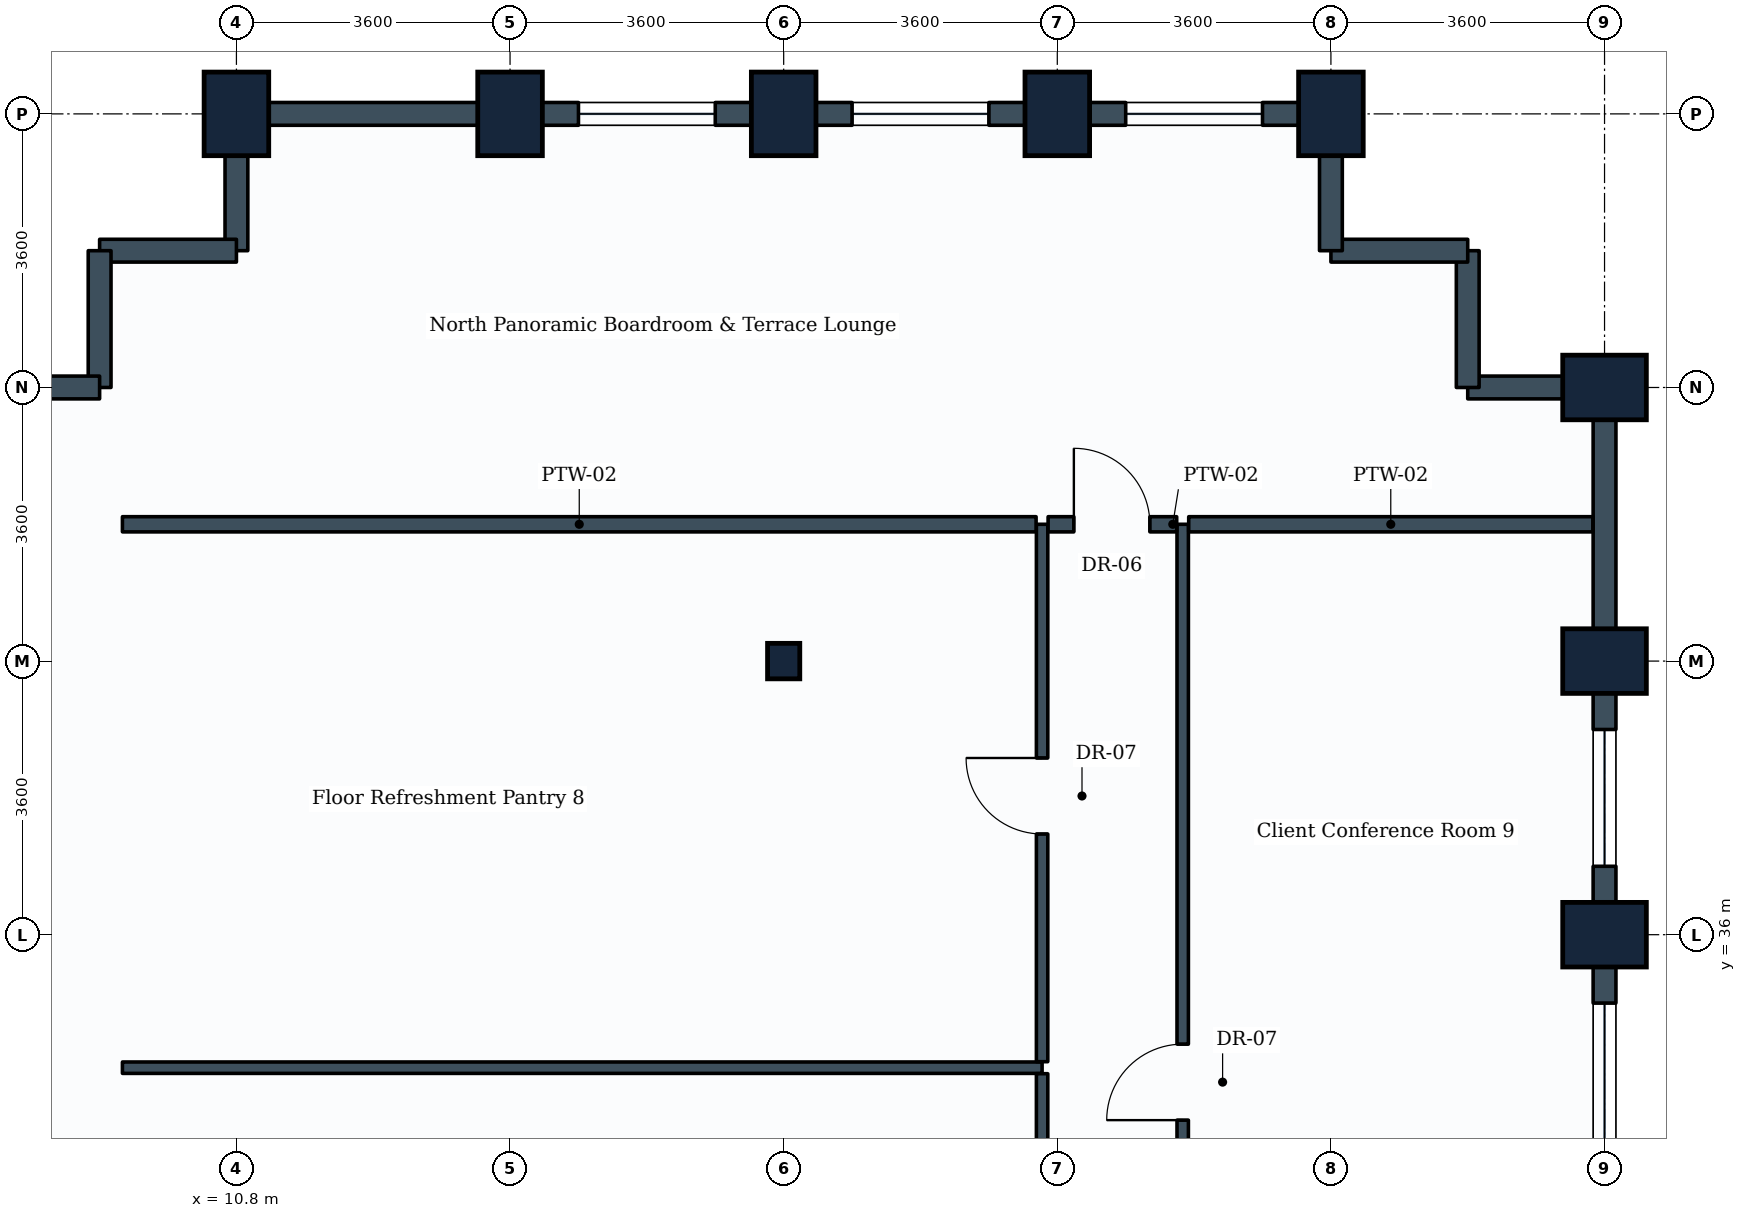
"""IFC4 building model, lengths in metres.
Left out: names, types, materials, properties, quantities, classifications, styles, units other than length and angle.
Written with IfcOpenShell. Run it as: python <this file> out.ifc"""

import sys

from ifc_helpers import new_model, si_unit, direction, frame, frame_2d, origin, origin_2d, place, context, subcontext, project, spatial, rectangle, i_section, extrude, element, fill, save


model = new_model("IFC4")
c1 = context("Model", 3, precision=1e-05, world=origin(), true_north=direction((0.0, 1.0)))
c2 = subcontext(c1, "Body", "Model", "MODEL_VIEW")
j1 = project(units=[si_unit("LENGTHUNIT", "METRE"), si_unit("PLANEANGLEUNIT", "RADIAN")], contexts=[c1])
p1 = place(None, origin())
s1 = spatial("IfcSite", under=j1, at=p1, CompositionType="ELEMENT")
p2 = place(p1, origin())
s2 = spatial("IfcBuilding", under=s1, at=p2, CompositionType="ELEMENT")
p3 = place(p2, frame((0.0, 0.0, 87.9)))
s3 = spatial("IfcBuildingStorey", under=s2, at=p3, CompositionType="ELEMENT", Elevation=87.9)
for number, where, z_axis, x_axis in (
    (1, (10.8, 46.8, 0.0), (0.0, 0.0, 1.0), (1.0, 0.0, 0.0)),
    (2, (14.4, 46.8, 0.0), (0.0, 0.0, 1.0), (1.0, 0.0, 0.0)),
):
    element("IfcColumn", number, at=place(p3, frame(where, z_axis=z_axis, x_axis=x_axis)), inside=s3, PredefinedType="COLUMN", context=c2, shape_type="SweptSolid", body=[
        extrude(rectangle(XDim=0.85, YDim=1.1, at=origin_2d()), origin(), (0.0, 0.0, 1.0), 3.9),
    ])
p4 = place(p3, frame((18.0, 39.6, 0.0), z_axis=(0.0, 0.0, 1.0), x_axis=(1.0, 0.0, 0.0)))
e3 = element("IfcColumn", 3, at=p4, inside=s3, PredefinedType="COLUMN", context=c2, shape_type="SweptSolid", body=[
    extrude(i_section(OverallWidth=0.424, OverallDepth=0.467, WebThickness=0.033, FlangeThickness=0.053, FilletRadius=0.015, at=origin_2d()), origin(), (0.0, 0.0, 1.0), 3.9),
])
for number, where, z_axis, x_axis in (
    (4, (18.0, 46.8, 0.0), (0.0, 0.0, 1.0), (1.0, 0.0, 0.0)),
    (5, (21.6, 46.8, 0.0), (0.0, 0.0, 1.0), (1.0, 0.0, 0.0)),
    (6, (25.2, 46.8, 0.0), (0.0, 0.0, 1.0), (1.0, 0.0, 0.0)),
    (7, (28.8, 36.0, 0.0), (0.0, 0.0, 1.0), (0.0, 1.0, 0.0)),
    (8, (28.8, 39.6, 0.0), (0.0, 0.0, 1.0), (0.0, 1.0, 0.0)),
    (9, (28.8, 43.2, 0.0), (0.0, 0.0, 1.0), (0.0, 1.0, 0.0)),
):
    element("IfcColumn", number, at=place(p3, frame(where, z_axis=z_axis, x_axis=x_axis)), inside=s3, PredefinedType="COLUMN", context=c2, shape_type="SweptSolid", body=[
        extrude(rectangle(XDim=0.85, YDim=1.1, at=origin_2d()), origin(), (0.0, 0.0, 1.0), 3.9),
    ])
p5 = place(p3, frame((28.8, 36.0, 0.0), z_axis=(0.0, 0.0, 1.0), x_axis=(0.0, -1.0, 0.0)))
e10 = element("IfcWall", 10, at=p5, inside=s3, PredefinedType="STANDARD", context=c2, shape_type="SweptSolid", body=[
    extrude(rectangle(XDim=3.6, YDim=0.3, at=frame_2d((1.8, 0.0))), origin(), (0.0, 0.0, 1.0), 2.93),
])
p6 = place(p5, frame((0.9, 0.0, 0.85)))
e11 = element("IfcOpeningElement", 11, at=p6, cuts=e10, PredefinedType="OPENING", context=c2, shape_type="SweptSolid", body=[
    extrude(rectangle(XDim=1.8, YDim=1.35, at=frame_2d((0.9, 0.675))), frame((0.0, 0.16, 0.0), z_axis=(0.0, -1.0, 0.0), x_axis=(1.0, 0.0, 0.0)), (0.0, 0.0, 1.0), 0.32),
])
p7 = place(p3, frame((28.8, 39.6, 0.0), z_axis=(0.0, 0.0, 1.0), x_axis=(0.0, -1.0, 0.0)))
e12 = element("IfcWall", 12, at=p7, inside=s3, PredefinedType="STANDARD", context=c2, shape_type="SweptSolid", body=[
    extrude(rectangle(XDim=3.6, YDim=0.3, at=frame_2d((1.8, 0.0))), origin(), (0.0, 0.0, 1.0), 2.93),
])
p8 = place(p7, frame((0.9, 0.0, 0.85)))
e13 = element("IfcOpeningElement", 13, at=p8, cuts=e12, PredefinedType="OPENING", context=c2, shape_type="SweptSolid", body=[
    extrude(rectangle(XDim=1.8, YDim=1.35, at=frame_2d((0.9, 0.675))), frame((0.0, 0.16, 0.0), z_axis=(0.0, -1.0, 0.0), x_axis=(1.0, 0.0, 0.0)), (0.0, 0.0, 1.0), 0.32),
])
p9 = place(p3, frame((28.8, 43.2, 0.0), z_axis=(0.0, 0.0, 1.0), x_axis=(0.0, -1.0, 0.0)))
e14 = element("IfcWall", 14, at=p9, inside=s3, PredefinedType="STANDARD", context=c2, shape_type="SweptSolid", body=[
    extrude(rectangle(XDim=3.6, YDim=0.3, at=frame_2d((1.8, 0.0))), origin(), (0.0, 0.0, 1.0), 2.93),
])
p10 = place(p3, frame((27.0, 43.2, 0.0), z_axis=(0.0, 0.0, 1.0), x_axis=(1.0, 0.0, 0.0)))
e15 = element("IfcWall", 15, at=p10, inside=s3, PredefinedType="STANDARD", context=c2, shape_type="SweptSolid", body=[
    extrude(rectangle(XDim=1.8, YDim=0.3, at=frame_2d((0.9, 0.0))), origin(), (0.0, 0.0, 1.0), 2.93),
])
for number, where, z_axis, x_axis in (
    (16, (27.0, 43.2, 0.0), (0.0, 0.0, 1.0), (0.0, 1.0, 0.0)),
    (17, (25.2, 45.0, 0.0), (0.0, 0.0, 1.0), (1.0, 0.0, 0.0)),
):
    element("IfcWall", number, at=place(p3, frame(where, z_axis=z_axis, x_axis=x_axis)), inside=s3, PredefinedType="STANDARD", context=c2, shape_type="SweptSolid", body=[
        extrude(rectangle(XDim=1.8, YDim=0.3, at=frame_2d((0.9, 0.0))), origin(), (0.0, 0.0, 1.0), 3.635),
    ])
p11 = place(p3, frame((25.2, 45.0, 0.0), z_axis=(0.0, 0.0, 1.0), x_axis=(0.0, 1.0, 0.0)))
e18 = element("IfcWall", 18, at=p11, inside=s3, PredefinedType="STANDARD", context=c2, shape_type="SweptSolid", body=[
    extrude(rectangle(XDim=1.8, YDim=0.3, at=frame_2d((0.9, 0.0))), origin(), (0.0, 0.0, 1.0), 2.93),
])
p12 = place(p3, frame((21.6, 46.8, 0.0), z_axis=(0.0, 0.0, 1.0), x_axis=(1.0, 0.0, 0.0)))
e19 = element("IfcWall", 19, at=p12, inside=s3, PredefinedType="STANDARD", context=c2, shape_type="SweptSolid", body=[
    extrude(rectangle(XDim=3.6, YDim=0.3, at=frame_2d((1.8, 0.0))), origin(), (0.0, 0.0, 1.0), 2.93),
])
p13 = place(p12, frame((0.9, 0.0, 0.85)))
e20 = element("IfcOpeningElement", 20, at=p13, cuts=e19, PredefinedType="OPENING", context=c2, shape_type="SweptSolid", body=[
    extrude(rectangle(XDim=1.8, YDim=1.35, at=frame_2d((0.9, 0.675))), frame((0.0, 0.16, 0.0), z_axis=(0.0, -1.0, 0.0), x_axis=(1.0, 0.0, 0.0)), (0.0, 0.0, 1.0), 0.32),
])
p14 = place(p3, frame((18.0, 46.8, 0.0), z_axis=(0.0, 0.0, 1.0), x_axis=(1.0, 0.0, 0.0)))
e21 = element("IfcWall", 21, at=p14, inside=s3, PredefinedType="STANDARD", context=c2, shape_type="SweptSolid", body=[
    extrude(rectangle(XDim=3.6, YDim=0.3, at=frame_2d((1.8, 0.0))), origin(), (0.0, 0.0, 1.0), 2.93),
])
p15 = place(p14, frame((0.9, 0.0, 0.85)))
e22 = element("IfcOpeningElement", 22, at=p15, cuts=e21, PredefinedType="OPENING", context=c2, shape_type="SweptSolid", body=[
    extrude(rectangle(XDim=1.8, YDim=1.35, at=frame_2d((0.9, 0.675))), frame((0.0, 0.16, 0.0), z_axis=(0.0, -1.0, 0.0), x_axis=(1.0, 0.0, 0.0)), (0.0, 0.0, 1.0), 0.32),
])
p16 = place(p3, frame((14.4, 46.8, 0.0), z_axis=(0.0, 0.0, 1.0), x_axis=(1.0, 0.0, 0.0)))
e23 = element("IfcWall", 23, at=p16, inside=s3, PredefinedType="STANDARD", context=c2, shape_type="SweptSolid", body=[
    extrude(rectangle(XDim=3.6, YDim=0.3, at=frame_2d((1.8, 0.0))), origin(), (0.0, 0.0, 1.0), 2.93),
])
p17 = place(p16, frame((0.9, 0.0, 0.85)))
e24 = element("IfcOpeningElement", 24, at=p17, cuts=e23, PredefinedType="OPENING", context=c2, shape_type="SweptSolid", body=[
    extrude(rectangle(XDim=1.8, YDim=1.35, at=frame_2d((0.9, 0.675))), frame((0.0, 0.16, 0.0), z_axis=(0.0, -1.0, 0.0), x_axis=(1.0, 0.0, 0.0)), (0.0, 0.0, 1.0), 0.32),
])
p18 = place(p3, frame((10.8, 46.8, 0.0), z_axis=(0.0, 0.0, 1.0), x_axis=(1.0, 0.0, 0.0)))
e25 = element("IfcWall", 25, at=p18, inside=s3, PredefinedType="STANDARD", context=c2, shape_type="SweptSolid", body=[
    extrude(rectangle(XDim=3.6, YDim=0.3, at=frame_2d((1.8, 0.0))), origin(), (0.0, 0.0, 1.0), 2.93),
])
p19 = place(p3, frame((10.8, 45.0, 0.0), z_axis=(0.0, 0.0, 1.0), x_axis=(0.0, 1.0, 0.0)))
e26 = element("IfcWall", 26, at=p19, inside=s3, PredefinedType="STANDARD", context=c2, shape_type="SweptSolid", body=[
    extrude(rectangle(XDim=1.8, YDim=0.3, at=frame_2d((0.9, 0.0))), origin(), (0.0, 0.0, 1.0), 2.93),
])
for number, where, z_axis, x_axis in (
    (27, (9.0, 45.0, 0.0), (0.0, 0.0, 1.0), (1.0, 0.0, 0.0)),
    (28, (9.0, 43.2, 0.0), (0.0, 0.0, 1.0), (0.0, 1.0, 0.0)),
):
    element("IfcWall", number, at=place(p3, frame(where, z_axis=z_axis, x_axis=x_axis)), inside=s3, PredefinedType="STANDARD", context=c2, shape_type="SweptSolid", body=[
        extrude(rectangle(XDim=1.8, YDim=0.3, at=frame_2d((0.9, 0.0))), origin(), (0.0, 0.0, 1.0), 3.635),
    ])
p20 = place(p3, frame((7.2, 43.2, 0.0), z_axis=(0.0, 0.0, 1.0), x_axis=(1.0, 0.0, 0.0)))
e29 = element("IfcWall", 29, at=p20, inside=s3, PredefinedType="STANDARD", context=c2, shape_type="SweptSolid", body=[
    extrude(rectangle(XDim=1.8, YDim=0.3, at=frame_2d((0.9, 0.0))), origin(), (0.0, 0.0, 1.0), 2.93),
])
p21 = place(p3, frame((9.3, 34.25, 0.0), z_axis=(0.0, 0.0, 1.0), x_axis=(1.0, 0.0, 0.0)))
e30 = element("IfcWall", 30, at=p21, inside=s3, PredefinedType="PARTITIONING", context=c2, shape_type="SweptSolid", body=[
    extrude(rectangle(XDim=12.1, YDim=0.15, at=frame_2d((6.05, 0.0))), origin(), (0.0, 0.0, 1.0), 3.18),
])
p22 = place(p3, frame((21.4, 26.879, 0.0), z_axis=(0.0, 0.0, 1.0), x_axis=(0.0, 1.0, 0.0)))
e31 = element("IfcWall", 31, at=p22, inside=s3, PredefinedType="PARTITIONING", context=c2, shape_type="SweptSolid", body=[
    extrude(rectangle(XDim=7.292, YDim=0.15, at=frame_2d((3.646, 0.0))), origin(), (0.0, 0.0, 1.0), 3.19),
])
p23 = place(p22, frame((3.146, 0.0, 0.0)))
e32 = element("IfcOpeningElement", 32, at=p23, cuts=e31, PredefinedType="OPENING", context=c2, shape_type="SweptSolid", body=[
    extrude(rectangle(XDim=1.0, YDim=2.1, at=frame_2d((0.5, 1.05))), frame((0.0, 0.085, 0.0), z_axis=(0.0, -1.0, 0.0), x_axis=(1.0, 0.0, 0.0)), (0.0, 0.0, 1.0), 0.17),
])
p24 = place(p3, frame((21.4, 34.329, 0.0), z_axis=(0.0, 0.0, 1.0), x_axis=(0.0, 1.0, 0.0)))
e33 = element("IfcWall", 33, at=p24, inside=s3, PredefinedType="PARTITIONING", context=c2, shape_type="SweptSolid", body=[
    extrude(rectangle(XDim=7.071, YDim=0.15, at=frame_2d((3.535, 0.0))), origin(), (0.0, 0.0, 1.0), 3.18),
])
p25 = place(p24, frame((2.996, 0.0, 0.0)))
e34 = element("IfcOpeningElement", 34, at=p25, cuts=e33, PredefinedType="OPENING", context=c2, shape_type="SweptSolid", body=[
    extrude(rectangle(XDim=1.0, YDim=2.1, at=frame_2d((0.5, 1.05))), frame((0.0, 0.085, 0.0), z_axis=(0.0, -1.0, 0.0), x_axis=(1.0, 0.0, 0.0)), (0.0, 0.0, 1.0), 0.17),
])
p26 = place(p3, frame((23.25, 26.879, 0.0), z_axis=(0.0, 0.0, 1.0), x_axis=(0.0, 1.0, 0.0)))
e35 = element("IfcWall", 35, at=p26, inside=s3, PredefinedType="PARTITIONING", context=c2, shape_type="SweptSolid", body=[
    extrude(rectangle(XDim=14.521, YDim=0.15, at=frame_2d((7.26, 0.0))), origin(), (0.0, 0.0, 1.0), 3.19),
])
p27 = place(p26, frame((6.681, 0.0, 0.0)))
e36 = element("IfcOpeningElement", 36, at=p27, cuts=e35, PredefinedType="OPENING", context=c2, shape_type="SweptSolid", body=[
    extrude(rectangle(XDim=1.0, YDim=2.1, at=frame_2d((0.5, 1.05))), frame((0.0, 0.085, 0.0), z_axis=(0.0, -1.0, 0.0), x_axis=(1.0, 0.0, 0.0)), (0.0, 0.0, 1.0), 0.17),
])
p28 = place(p3, frame((9.3, 41.4, 0.0), z_axis=(0.0, 0.0, 1.0), x_axis=(1.0, 0.0, 0.0)))
e37 = element("IfcWall", 37, at=p28, inside=s3, PredefinedType="PARTITIONING", context=c2, shape_type="SweptSolid", body=[
    extrude(rectangle(XDim=12.021, YDim=0.2, at=frame_2d((6.01, 0.0))), origin(), (0.0, 0.0, 1.0), 3.18),
])
p29 = place(p3, frame((23.329, 41.4, 0.0), z_axis=(0.0, 0.0, 1.0), x_axis=(1.0, 0.0, 0.0)))
e38 = element("IfcWall", 38, at=p29, inside=s3, PredefinedType="PARTITIONING", context=c2, shape_type="SweptSolid", body=[
    extrude(rectangle(XDim=5.317, YDim=0.2, at=frame_2d((2.658, 0.0))), origin(), (0.0, 0.0, 1.0), 2.93),
])
p30 = place(p3, frame((21.479, 41.4, 0.0), z_axis=(0.0, 0.0, 1.0), x_axis=(1.0, 0.0, 0.0)))
e39 = element("IfcWall", 39, at=p30, inside=s3, PredefinedType="PARTITIONING", context=c2, shape_type="SweptSolid", body=[
    extrude(rectangle(XDim=1.692, YDim=0.2, at=frame_2d((0.846, 0.0))), origin(), (0.0, 0.0, 1.0), 3.635),
])
p31 = place(p30, frame((0.339, 0.0, 0.0)))
e40 = element("IfcOpeningElement", 40, at=p31, cuts=e39, PredefinedType="OPENING", context=c2, shape_type="SweptSolid", body=[
    extrude(rectangle(XDim=1.0, YDim=2.1, at=frame_2d((0.5, 1.05))), frame((0.0, 0.11, 0.0), z_axis=(0.0, -1.0, 0.0), x_axis=(1.0, 0.0, 0.0)), (0.0, 0.0, 1.0), 0.22),
])
p32 = place(p6, origin())
e41 = element("IfcWindow", 41, at=p32, inside=s3, PartitioningType="SINGLE_PANEL", PredefinedType="WINDOW", context=c2, shape_type="SweptSolid", body=[
    extrude(rectangle(XDim=1.8, YDim=1.35, at=frame_2d((0.9, 0.675))), frame((0.0, 0.03, 0.0), z_axis=(0.0, -1.0, 0.0), x_axis=(1.0, 0.0, 0.0)), (0.0, 0.0, 1.0), 0.06),
])
fill(e11, e41)
p33 = place(p8, origin())
e42 = element("IfcWindow", 42, at=p33, inside=s3, PartitioningType="SINGLE_PANEL", PredefinedType="WINDOW", context=c2, shape_type="SweptSolid", body=[
    extrude(rectangle(XDim=1.8, YDim=1.35, at=frame_2d((0.9, 0.675))), frame((0.0, 0.03, 0.0), z_axis=(0.0, -1.0, 0.0), x_axis=(1.0, 0.0, 0.0)), (0.0, 0.0, 1.0), 0.06),
])
fill(e13, e42)
p34 = place(p13, origin())
e43 = element("IfcWindow", 43, at=p34, inside=s3, PartitioningType="SINGLE_PANEL", PredefinedType="WINDOW", context=c2, shape_type="SweptSolid", body=[
    extrude(rectangle(XDim=1.8, YDim=1.35, at=frame_2d((0.9, 0.675))), frame((0.0, 0.03, 0.0), z_axis=(0.0, -1.0, 0.0), x_axis=(1.0, 0.0, 0.0)), (0.0, 0.0, 1.0), 0.06),
])
fill(e20, e43)
p35 = place(p15, origin())
e44 = element("IfcWindow", 44, at=p35, inside=s3, PartitioningType="SINGLE_PANEL", PredefinedType="WINDOW", context=c2, shape_type="SweptSolid", body=[
    extrude(rectangle(XDim=1.8, YDim=1.35, at=frame_2d((0.9, 0.675))), frame((0.0, 0.03, 0.0), z_axis=(0.0, -1.0, 0.0), x_axis=(1.0, 0.0, 0.0)), (0.0, 0.0, 1.0), 0.06),
])
fill(e22, e44)
p36 = place(p17, origin())
e45 = element("IfcWindow", 45, at=p36, inside=s3, PartitioningType="SINGLE_PANEL", PredefinedType="WINDOW", context=c2, shape_type="SweptSolid", body=[
    extrude(rectangle(XDim=1.8, YDim=1.35, at=frame_2d((0.9, 0.675))), frame((0.0, 0.03, 0.0), z_axis=(0.0, -1.0, 0.0), x_axis=(1.0, 0.0, 0.0)), (0.0, 0.0, 1.0), 0.06),
])
fill(e24, e45)
p37 = place(p25, origin())
e46 = element("IfcDoor", 46, at=p37, inside=s3, OperationType="SINGLE_SWING_RIGHT", PredefinedType="DOOR", context=c2, shape_type="SweptSolid", body=[
    extrude(rectangle(XDim=1.0, YDim=2.1, at=frame_2d((0.5, 1.05))), frame((0.0, 0.025, 0.0), z_axis=(0.0, -1.0, 0.0), x_axis=(1.0, 0.0, 0.0)), (0.0, 0.0, 1.0), 0.05),
])
fill(e34, e46)
p38 = place(p27, origin())
e47 = element("IfcDoor", 47, at=p38, inside=s3, OperationType="SINGLE_SWING_LEFT", PredefinedType="DOOR", context=c2, shape_type="SweptSolid", body=[
    extrude(rectangle(XDim=1.0, YDim=2.1, at=frame_2d((0.5, 1.05))), frame((0.0, 0.025, 0.0), z_axis=(0.0, -1.0, 0.0), x_axis=(1.0, 0.0, 0.0)), (0.0, 0.0, 1.0), 0.05),
])
fill(e36, e47)
p39 = place(p31, origin())
e48 = element("IfcDoor", 48, at=p39, inside=s3, OperationType="SINGLE_SWING_LEFT", PredefinedType="DOOR", context=c2, shape_type="SweptSolid", body=[
    extrude(rectangle(XDim=1.0, YDim=2.1, at=frame_2d((0.5, 1.05))), frame((0.0, 0.025, 0.0), z_axis=(0.0, -1.0, 0.0), x_axis=(1.0, 0.0, 0.0)), (0.0, 0.0, 1.0), 0.05),
])
fill(e40, e48)
save(model, sys.argv[1])
